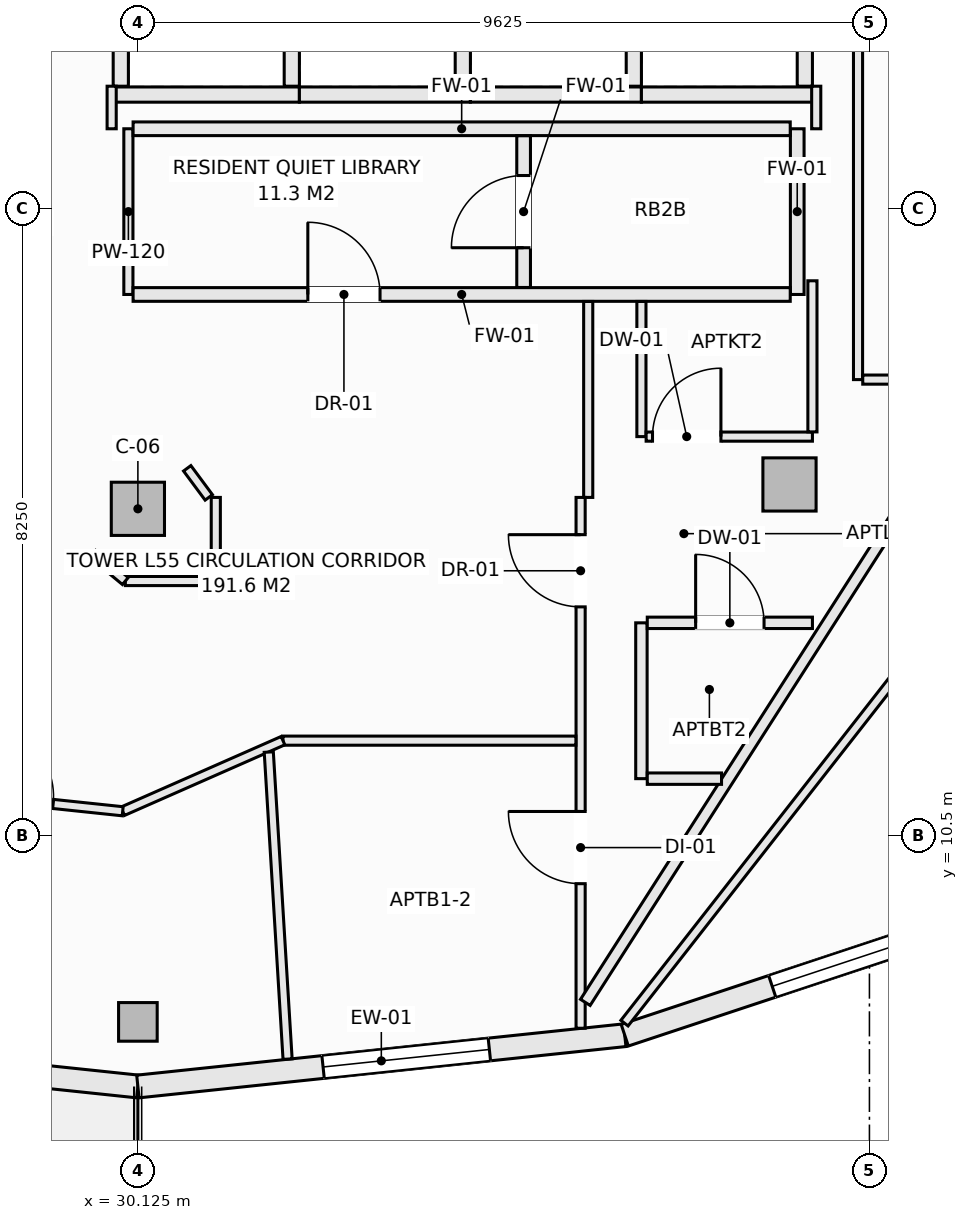
"""IFC4 building model, lengths in metres.
Left out: names, types, materials, properties, quantities, classifications, styles, units other than length and angle.
Written with IfcOpenShell. Run it as: python <this file> out.ifc"""

import sys

from ifc_helpers import new_model, si_unit, direction, frame, frame_2d, origin, origin_2d, place, context, subcontext, project, spatial, rectangle, hollow_rectangle, extrude, element, fill, save


model = new_model("IFC4")
c1 = context("Model", 3, precision=1e-05, world=origin(), true_north=direction((0.0, 1.0)))
c2 = subcontext(c1, "Body", "Model", "MODEL_VIEW")
j1 = project(units=[si_unit("LENGTHUNIT", "METRE"), si_unit("PLANEANGLEUNIT", "RADIAN")], contexts=[c1])
p1 = place(None, origin())
s1 = spatial("IfcSite", under=j1, at=p1, CompositionType="ELEMENT")
p2 = place(p1, origin())
s2 = spatial("IfcBuilding", under=s1, at=p2, CompositionType="ELEMENT")
p3 = place(p2, frame((0.0, 0.0, 209.6)))
s3 = spatial("IfcBuildingStorey", under=s2, at=p3, CompositionType="ELEMENT", Elevation=209.6)
p4 = place(p3, frame((30.125, 8.05, -0.27), z_axis=(0.0, 0.0, 1.0), x_axis=(1.0, 0.0, 0.0)))
e1 = element("IfcColumn", 1, at=p4, inside=s3, PredefinedType="COLUMN", context=c2, shape_type="SweptSolid", body=[
    extrude(hollow_rectangle(XDim=0.508, YDim=0.508, WallThickness=0.019, at=origin_2d()), origin(), (0.0, 0.0, 1.0), 3.3),
])
for number, where, z_axis, x_axis in (
    (2, (30.125, 14.8, -0.27), (0.0, 0.0, 1.0), (1.0, 0.0, 0.0)),
    (3, (38.698, 15.121, -0.27), (0.0, 0.0, 1.0), (1.0, 0.0, 0.0)),
):
    element("IfcColumn", number, at=place(p3, frame(where, z_axis=z_axis, x_axis=x_axis)), inside=s3, PredefinedType="COLUMN", context=c2, shape_type="SweptSolid", body=[
        extrude(rectangle(XDim=0.7, YDim=0.7, at=origin_2d()), origin(), (0.0, 0.0, 1.0), 3.3),
    ])
p5 = place(p3, frame((23.719, 7.875, 0.0), z_axis=(0.0, 0.0, 1.0), x_axis=(0.994497142298, -0.104763705363, 0.0)))
e4 = element("IfcWall", 4, at=p5, inside=s3, PredefinedType="SOLIDWALL", context=c2, shape_type="SweptSolid", body=[
    extrude(rectangle(XDim=6.441, YDim=0.3, at=frame_2d((3.221, 0.0))), origin(), (0.0, 0.0, 1.0), 2.605),
])
p6 = place(p5, frame((2.121, 0.0, 0.72)))
e5 = element("IfcOpeningElement", 5, at=p6, cuts=e4, PredefinedType="OPENING", context=c2, shape_type="SweptSolid", body=[
    extrude(rectangle(XDim=2.2, YDim=1.65, at=frame_2d((1.1, 0.825))), frame((0.0, 0.16, 0.0), z_axis=(0.0, -1.0, 0.0), x_axis=(1.0, 0.0, 0.0)), (0.0, 0.0, 1.0), 0.32),
])
p7 = place(p3, frame((30.125, 7.2, 0.0), z_axis=(0.0, 0.0, 1.0), x_axis=(0.994497142298, 0.104763705363, 0.0)))
e6 = element("IfcWall", 6, at=p7, inside=s3, PredefinedType="SOLIDWALL", context=c2, shape_type="SweptSolid", body=[
    extrude(rectangle(XDim=6.441, YDim=0.3, at=frame_2d((3.221, 0.0))), origin(), (0.0, 0.0, 1.0), 2.605),
])
p8 = place(p7, frame((2.45, 0.0, 0.72)))
e7 = element("IfcOpeningElement", 7, at=p8, cuts=e6, PredefinedType="OPENING", context=c2, shape_type="SweptSolid", body=[
    extrude(rectangle(XDim=2.2, YDim=1.65, at=frame_2d((1.1, 0.825))), frame((0.0, 0.16, 0.0), z_axis=(0.0, -1.0, 0.0), x_axis=(1.0, 0.0, 0.0)), (0.0, 0.0, 1.0), 0.32),
])
p9 = place(p3, frame((36.531, 7.875, 0.0), z_axis=(0.0, 0.0, 1.0), x_axis=(0.949240877604, 0.314550085495, 0.0)))
e8 = element("IfcWall", 8, at=p9, inside=s3, PredefinedType="SOLIDWALL", context=c2, shape_type="SweptSolid", body=[
    extrude(rectangle(XDim=6.288, YDim=0.3, at=frame_2d((3.144, 0.0))), origin(), (0.0, 0.0, 1.0), 2.605),
])
p10 = place(p9, frame((2.044, 0.0, 0.72)))
e9 = element("IfcOpeningElement", 9, at=p10, cuts=e8, PredefinedType="OPENING", context=c2, shape_type="SweptSolid", body=[
    extrude(rectangle(XDim=2.2, YDim=1.65, at=frame_2d((1.1, 0.825))), frame((0.0, 0.16, 0.0), z_axis=(0.0, -1.0, 0.0), x_axis=(1.0, 0.0, 0.0)), (0.0, 0.0, 1.0), 0.32),
])
p11 = place(p3, frame((29.8, 20.25, 0.0), z_axis=(0.0, 0.0, 1.0), x_axis=(1.0, 0.0, 0.0)))
e10 = element("IfcWall", 10, at=p11, inside=s3, PredefinedType="SOLIDWALL", context=c2, shape_type="SweptSolid", body=[
    extrude(rectangle(XDim=2.45, YDim=0.2, at=frame_2d((1.225, 0.0))), origin(), (0.0, 0.0, 1.0), 3.03),
])
for number, where, z_axis, x_axis in (
    (11, (29.9, 20.36, 0.0), (0.0, 0.0, 1.0), (0.0, 1.0, 0.0)),
    (12, (32.15, 20.36, 0.0), (0.0, 0.0, 1.0), (0.0, 1.0, 0.0)),
):
    element("IfcWall", number, at=place(p3, frame(where, z_axis=z_axis, x_axis=x_axis)), inside=s3, PredefinedType="SOLIDWALL", context=c2, shape_type="SweptSolid", body=[
        extrude(rectangle(XDim=2.43, YDim=0.2, at=frame_2d((1.215, 0.0))), origin(), (0.0, 0.0, 1.0), 3.03),
    ])
p12 = place(p3, frame((32.25, 20.25, 0.0), z_axis=(0.0, 0.0, 1.0), x_axis=(1.0, 0.0, 0.0)))
e13 = element("IfcWall", 13, at=p12, inside=s3, PredefinedType="SOLIDWALL", context=c2, shape_type="SweptSolid", body=[
    extrude(rectangle(XDim=2.25, YDim=0.2, at=frame_2d((1.125, 0.0))), origin(), (0.0, 0.0, 1.0), 3.03),
])
p13 = place(p3, frame((34.4, 20.36, 0.0), z_axis=(0.0, 0.0, 1.0), x_axis=(0.0, 1.0, 0.0)))
e14 = element("IfcWall", 14, at=p13, inside=s3, PredefinedType="SOLIDWALL", context=c2, shape_type="SweptSolid", body=[
    extrude(rectangle(XDim=2.43, YDim=0.2, at=frame_2d((1.215, 0.0))), origin(), (0.0, 0.0, 1.0), 3.03),
])
p14 = place(p3, frame((34.5, 20.25, 0.0), z_axis=(0.0, 0.0, 1.0), x_axis=(1.0, 0.0, 0.0)))
e15 = element("IfcWall", 15, at=p14, inside=s3, PredefinedType="SOLIDWALL", context=c2, shape_type="SweptSolid", body=[
    extrude(rectangle(XDim=2.25, YDim=0.2, at=frame_2d((1.125, 0.0))), origin(), (0.0, 0.0, 1.0), 3.03),
])
p15 = place(p3, frame((36.65, 20.36, 0.0), z_axis=(0.0, 0.0, 1.0), x_axis=(0.0, 1.0, 0.0)))
e16 = element("IfcWall", 16, at=p15, inside=s3, PredefinedType="SOLIDWALL", context=c2, shape_type="SweptSolid", body=[
    extrude(rectangle(XDim=2.43, YDim=0.2, at=frame_2d((1.215, 0.0))), origin(), (0.0, 0.0, 1.0), 3.03),
])
p16 = place(p3, frame((36.75, 20.25, 0.0), z_axis=(0.0, 0.0, 1.0), x_axis=(1.0, 0.0, 0.0)))
e17 = element("IfcWall", 17, at=p16, inside=s3, PredefinedType="SOLIDWALL", context=c2, shape_type="SweptSolid", body=[
    extrude(rectangle(XDim=2.25, YDim=0.2, at=frame_2d((1.125, 0.0))), origin(), (0.0, 0.0, 1.0), 3.03),
])
p17 = place(p3, frame((38.9, 20.36, 0.0), z_axis=(0.0, 0.0, 1.0), x_axis=(0.0, 1.0, 0.0)))
e18 = element("IfcWall", 18, at=p17, inside=s3, PredefinedType="SOLIDWALL", context=c2, shape_type="SweptSolid", body=[
    extrude(rectangle(XDim=2.43, YDim=0.2, at=frame_2d((1.215, 0.0))), origin(), (0.0, 0.0, 1.0), 3.03),
])
p18 = place(p3, frame((30.0, 17.62, 0.0), z_axis=(0.0, 0.0, 1.0), x_axis=(0.0, 1.0, 0.0)))
e19 = element("IfcWall", 19, at=p18, inside=s3, PredefinedType="PARTITIONING", context=c2, shape_type="SweptSolid", body=[
    extrude(rectangle(XDim=2.18, YDim=0.12, at=frame_2d((1.09, 0.0))), origin(), (0.0, 0.0, 1.0), 3.03),
])
p19 = place(p3, frame((38.8, 17.62, 0.0), z_axis=(0.0, 0.0, 1.0), x_axis=(0.0, 1.0, 0.0)))
e20 = element("IfcWall", 20, at=p19, inside=s3, PredefinedType="SOLIDWALL", context=c2, shape_type="SweptSolid", body=[
    extrude(rectangle(XDim=2.18, YDim=0.18, at=frame_2d((1.09, 0.0))), origin(), (0.0, 0.0, 1.0), 3.03),
])
p20 = place(p3, frame((30.062, 17.62, 0.0), z_axis=(0.0, 0.0, 1.0), x_axis=(1.0, 0.0, 0.0)))
e21 = element("IfcWall", 21, at=p20, inside=s3, PredefinedType="SOLIDWALL", context=c2, shape_type="SweptSolid", body=[
    extrude(rectangle(XDim=8.646, YDim=0.18, at=frame_2d((4.323, 0.0))), origin(), (0.0, 0.0, 1.0), 3.03),
])
p21 = place(p20, frame((2.299, 0.0, 0.0)))
e22 = element("IfcOpeningElement", 22, at=p21, cuts=e21, PredefinedType="OPENING", context=c2, shape_type="SweptSolid", body=[
    extrude(rectangle(XDim=0.95, YDim=2.1, at=frame_2d((0.475, 1.05))), frame((0.0, 0.1, 0.0), z_axis=(0.0, -1.0, 0.0), x_axis=(1.0, 0.0, 0.0)), (0.0, 0.0, 1.0), 0.2),
])
p22 = place(p3, frame((30.062, 19.8, 0.0), z_axis=(0.0, 0.0, 1.0), x_axis=(1.0, 0.0, 0.0)))
e23 = element("IfcWall", 23, at=p22, inside=s3, PredefinedType="SOLIDWALL", context=c2, shape_type="SweptSolid", body=[
    extrude(rectangle(XDim=8.646, YDim=0.18, at=frame_2d((4.323, 0.0))), origin(), (0.0, 0.0, 1.0), 3.03),
])
p23 = place(p3, frame((35.2, 17.712, 0.0), z_axis=(0.0, 0.0, 1.0), x_axis=(0.0, 1.0, 0.0)))
e24 = element("IfcWall", 24, at=p23, inside=s3, PredefinedType="SOLIDWALL", context=c2, shape_type="SweptSolid", body=[
    extrude(rectangle(XDim=1.996, YDim=0.18, at=frame_2d((0.998, 0.0))), origin(), (0.0, 0.0, 1.0), 3.03),
])
p24 = place(p23, frame((0.523, 0.0, 0.0)))
e25 = element("IfcOpeningElement", 25, at=p24, cuts=e24, PredefinedType="OPENING", context=c2, shape_type="SweptSolid", body=[
    extrude(rectangle(XDim=0.95, YDim=2.1, at=frame_2d((0.475, 1.05))), frame((0.0, 0.1, 0.0), z_axis=(0.0, -1.0, 0.0), x_axis=(1.0, 0.0, 0.0)), (0.0, 0.0, 1.0), 0.2),
])
p25 = place(p3, frame((39.05, 19.8, 0.0), z_axis=(0.0, 0.0, 1.0), x_axis=(0.0, 1.0, 0.0)))
e26 = element("IfcWall", 26, at=p25, inside=s3, PredefinedType="PARTITIONING", context=c2, shape_type="SweptSolid", body=[
    extrude(rectangle(XDim=0.56, YDim=0.12, at=frame_2d((0.28, 0.0))), origin(), (0.0, 0.0, 1.0), 3.03),
])
p26 = place(p3, frame((39.6, 16.5, 0.0), z_axis=(0.0, 0.0, 1.0), x_axis=(0.0, 1.0, 0.0)))
e27 = element("IfcWall", 27, at=p26, inside=s3, PredefinedType="PARTITIONING", context=c2, shape_type="SweptSolid", body=[
    extrude(rectangle(XDim=6.52, YDim=0.12, at=frame_2d((3.26, 0.0))), origin(), (0.0, 0.0, 1.0), 2.478),
])
p27 = place(p3, frame((36.527, 8.034, 0.0), z_axis=(0.0, 0.0, 1.0), x_axis=(0.616547497682, 0.787317714206, 0.0)))
e28 = element("IfcWall", 28, at=p27, inside=s3, PredefinedType="PARTITIONING", context=c2, shape_type="SweptSolid", body=[
    extrude(rectangle(XDim=13.151, YDim=0.12, at=frame_2d((6.576, 0.0))), origin(), (0.0, 0.0, 1.0), 3.03),
])
p28 = place(p27, frame((11.24, 0.0, 0.0)))
e29 = element("IfcOpeningElement", 29, at=p28, cuts=e28, PredefinedType="OPENING", context=c2, shape_type="SweptSolid", body=[
    extrude(rectangle(XDim=0.95, YDim=2.1, at=frame_2d((0.475, 1.05))), frame((0.0, 0.07, 0.0), z_axis=(0.0, -1.0, 0.0), x_axis=(1.0, 0.0, 0.0)), (0.0, 0.0, 1.0), 0.14),
])
p29 = place(p3, frame((39.662, 16.5, 0.0), z_axis=(0.0, 0.0, 1.0), x_axis=(1.0, 0.0, 0.0)))
e30 = element("IfcWall", 30, at=p29, inside=s3, PredefinedType="PARTITIONING", context=c2, shape_type="SweptSolid", body=[
    extrude(rectangle(XDim=3.416, YDim=0.12, at=frame_2d((1.708, 0.0))), origin(), (0.0, 0.0, 1.0), 2.712),
])
p30 = place(p3, frame((29.78, 19.8, 0.0), z_axis=(0.0, 0.0, 1.0), x_axis=(0.0, 1.0, 0.0)))
e31 = element("IfcWall", 31, at=p30, inside=s3, PredefinedType="PARTITIONING", context=c2, shape_type="SweptSolid", body=[
    extrude(rectangle(XDim=0.56, YDim=0.12, at=frame_2d((0.28, 0.0))), origin(), (0.0, 0.0, 1.0), 3.03),
])
p31 = place(p3, frame((36.05, 14.95, 0.0), z_axis=(0.0, 0.0, 1.0), x_axis=(0.0, 1.0, 0.0)))
e32 = element("IfcWall", 32, at=p31, inside=s3, PredefinedType="PARTITIONING", context=c2, shape_type="SweptSolid", body=[
    extrude(rectangle(XDim=2.578, YDim=0.12, at=frame_2d((1.289, 0.0))), origin(), (0.0, 0.0, 1.0), 3.03),
])
p32 = place(p3, frame((35.95, 7.966, 0.0), z_axis=(0.0, 0.0, 1.0), x_axis=(0.0, 1.0, 0.0)))
e33 = element("IfcWall", 33, at=p32, inside=s3, PredefinedType="PARTITIONING", context=c2, shape_type="SweptSolid", body=[
    extrude(rectangle(XDim=6.984, YDim=0.12, at=frame_2d((3.492, 0.0))), origin(), (0.0, 0.0, 1.0), 2.712),
])
p33 = place(p32, frame((5.544, 0.0, 0.0)))
e34 = element("IfcOpeningElement", 34, at=p33, cuts=e33, PredefinedType="OPENING", context=c2, shape_type="SweptSolid", body=[
    extrude(rectangle(XDim=0.95, YDim=2.1, at=frame_2d((0.475, 1.05))), frame((0.0, 0.07, 0.0), z_axis=(0.0, -1.0, 0.0), x_axis=(1.0, 0.0, 0.0)), (0.0, 0.0, 1.0), 0.14),
])
p34 = place(p32, frame((1.902, 0.0, 0.0)))
e35 = element("IfcOpeningElement", 35, at=p34, cuts=e33, PredefinedType="OPENING", context=c2, shape_type="SweptSolid", body=[
    extrude(rectangle(XDim=0.95, YDim=2.1, at=frame_2d((0.475, 1.05))), frame((0.0, 0.07, 0.0), z_axis=(0.0, -1.0, 0.0), x_axis=(1.0, 0.0, 0.0)), (0.0, 0.0, 1.0), 0.14),
])
p35 = place(p3, frame((32.034, 11.75, 0.0), z_axis=(0.0, 0.0, 1.0), x_axis=(1.0, 0.0, 0.0)))
e36 = element("IfcWall", 36, at=p35, inside=s3, PredefinedType="PARTITIONING", context=c2, shape_type="SweptSolid", body=[
    extrude(rectangle(XDim=3.854, YDim=0.12, at=frame_2d((1.927, 0.0))), origin(), (0.0, 0.0, 1.0), 3.03),
])
p36 = place(p3, frame((29.925, 10.821, 0.0), z_axis=(0.0, 0.0, 1.0), x_axis=(0.915147800009, 0.403118474072, 0.0)))
e37 = element("IfcWall", 37, at=p36, inside=s3, PredefinedType="PARTITIONING", context=c2, shape_type="SweptSolid", body=[
    extrude(rectangle(XDim=2.304, YDim=0.12, at=frame_2d((1.152, 0.0))), origin(), (0.0, 0.0, 1.0), 3.03),
])
p37 = place(p3, frame((27.15, 11.113, 0.0), z_axis=(0.0, 0.0, 1.0), x_axis=(0.994510245906, -0.104639241146, 0.0)))
e38 = element("IfcWall", 38, at=p37, inside=s3, PredefinedType="PARTITIONING", context=c2, shape_type="SweptSolid", body=[
    extrude(rectangle(XDim=2.791, YDim=0.12, at=frame_2d((1.395, 0.0))), origin(), (0.0, 0.0, 1.0), 3.03),
])
p38 = place(p37, frame((0.92, 0.0, 0.0)))
e39 = element("IfcOpeningElement", 39, at=p38, cuts=e38, PredefinedType="OPENING", context=c2, shape_type="SweptSolid", body=[
    extrude(rectangle(XDim=0.95, YDim=2.1, at=frame_2d((0.475, 1.05))), frame((0.0, 0.07, 0.0), z_axis=(0.0, -1.0, 0.0), x_axis=(1.0, 0.0, 0.0)), (0.0, 0.0, 1.0), 0.14),
])
p39 = place(p3, frame((29.96, 13.85, 0.0), z_axis=(0.0, 0.0, 1.0), x_axis=(1.0, 0.0, 0.0)))
e40 = element("IfcWall", 40, at=p39, inside=s3, PredefinedType="PARTITIONING", context=c2, shape_type="SweptSolid", body=[
    extrude(rectangle(XDim=1.19, YDim=0.12, at=frame_2d((0.595, 0.0))), origin(), (0.0, 0.0, 1.0), 3.03),
])
p40 = place(p3, frame((31.15, 13.912, 0.0), z_axis=(0.0, 0.0, 1.0), x_axis=(0.0, 1.0, 0.0)))
e41 = element("IfcWall", 41, at=p40, inside=s3, PredefinedType="PARTITIONING", context=c2, shape_type="SweptSolid", body=[
    extrude(rectangle(XDim=1.038, YDim=0.12, at=frame_2d((0.519, 0.0))), origin(), (0.0, 0.0, 1.0), 3.03),
])
p41 = place(p3, frame((30.774, 15.333, 0.0), z_axis=(0.0, 0.0, 1.0), x_axis=(0.595814974861, -0.803121731577, 0.0)))
e42 = element("IfcWall", 42, at=p41, inside=s3, PredefinedType="PARTITIONING", context=c2, shape_type="SweptSolid", body=[
    extrude(rectangle(XDim=0.477, YDim=0.12, at=frame_2d((0.239, 0.0))), origin(), (0.0, 0.0, 1.0), 3.03),
])
p42 = place(p3, frame((29.531, 14.206, 0.0), z_axis=(0.0, 0.0, 1.0), x_axis=(0.7695479554, -0.638589026166, 0.0)))
e43 = element("IfcWall", 43, at=p42, inside=s3, PredefinedType="PARTITIONING", context=c2, shape_type="SweptSolid", body=[
    extrude(rectangle(XDim=0.557, YDim=0.12, at=frame_2d((0.279, 0.0))), origin(), (0.0, 0.0, 1.0), 3.03),
])
p43 = place(p3, frame((31.847, 11.6, 0.0), z_axis=(0.0, 0.0, 1.0), x_axis=(0.061108836762, -0.998131108657, 0.0)))
e44 = element("IfcWall", 44, at=p43, inside=s3, PredefinedType="PARTITIONING", context=c2, shape_type="SweptSolid", body=[
    extrude(rectangle(XDim=4.047, YDim=0.12, at=frame_2d((2.023, 0.0))), origin(), (0.0, 0.0, 1.0), 3.03),
])
p44 = place(p3, frame((36.75, 11.25, 0.0), z_axis=(0.0, 0.0, 1.0), x_axis=(0.0, 1.0, 0.0)))
e45 = element("IfcWall", 45, at=p44, inside=s3, PredefinedType="PARTITIONING", context=c2, shape_type="SweptSolid", body=[
    extrude(rectangle(XDim=2.05, YDim=0.15, at=frame_2d((1.025, 0.0))), origin(), (0.0, 0.0, 1.0), 3.03),
])
p45 = place(p3, frame((36.75, 15.75, 0.0), z_axis=(0.0, 0.0, 1.0), x_axis=(0.0, 1.0, 0.0)))
e46 = element("IfcWall", 46, at=p45, inside=s3, PredefinedType="PARTITIONING", context=c2, shape_type="SweptSolid", body=[
    extrude(rectangle(XDim=1.778, YDim=0.12, at=frame_2d((0.889, 0.0))), origin(), (0.0, 0.0, 1.0), 3.03),
])
p46 = place(p3, frame((36.812, 15.75, 0.0), z_axis=(0.0, 0.0, 1.0), x_axis=(1.0, 0.0, 0.0)))
e47 = element("IfcWall", 47, at=p46, inside=s3, PredefinedType="PARTITIONING", context=c2, shape_type="SweptSolid", body=[
    extrude(rectangle(XDim=2.188, YDim=0.12, at=frame_2d((1.094, 0.0))), origin(), (0.0, 0.0, 1.0), 3.03),
])
p47 = place(p46, frame((0.084, 0.0, 0.0)))
e48 = element("IfcOpeningElement", 48, at=p47, cuts=e47, PredefinedType="OPENING", context=c2, shape_type="SweptSolid", body=[
    extrude(rectangle(XDim=0.9, YDim=2.1, at=frame_2d((0.45, 1.05))), frame((0.0, 0.07, 0.0), z_axis=(0.0, -1.0, 0.0), x_axis=(1.0, 0.0, 0.0)), (0.0, 0.0, 1.0), 0.14),
])
p48 = place(p3, frame((39.0, 15.812, 0.0), z_axis=(0.0, 0.0, 1.0), x_axis=(0.0, 1.0, 0.0)))
e49 = element("IfcWall", 49, at=p48, inside=s3, PredefinedType="PARTITIONING", context=c2, shape_type="SweptSolid", body=[
    extrude(rectangle(XDim=1.988, YDim=0.12, at=frame_2d((0.994, 0.0))), origin(), (0.0, 0.0, 1.0), 2.478),
])
p49 = place(p3, frame((36.012, 8.307, 0.0), z_axis=(0.0, 0.0, 1.0), x_axis=(0.539002742545, 0.842304008971, 0.0)))
e50 = element("IfcWall", 50, at=p49, inside=s3, PredefinedType="PARTITIONING", context=c2, shape_type="SweptSolid", body=[
    extrude(rectangle(XDim=9.654, YDim=0.15, at=frame_2d((4.827, 0.0))), origin(), (0.0, 0.0, 1.0), 3.03),
])
p50 = place(p3, frame((36.827, 13.3, 0.0), z_axis=(0.0, 0.0, 1.0), x_axis=(1.0, 0.0, 0.0)))
e51 = element("IfcWall", 51, at=p50, inside=s3, PredefinedType="PARTITIONING", context=c2, shape_type="SweptSolid", body=[
    extrude(rectangle(XDim=2.173, YDim=0.15, at=frame_2d((1.086, 0.0))), origin(), (0.0, 0.0, 1.0), 3.03),
])
p51 = place(p50, frame((0.636, 0.0, 0.0)))
e52 = element("IfcOpeningElement", 52, at=p51, cuts=e51, PredefinedType="OPENING", context=c2, shape_type="SweptSolid", body=[
    extrude(rectangle(XDim=0.9, YDim=2.1, at=frame_2d((0.45, 1.05))), frame((0.0, 0.085, 0.0), z_axis=(0.0, -1.0, 0.0), x_axis=(1.0, 0.0, 0.0)), (0.0, 0.0, 1.0), 0.17),
])
p52 = place(p3, frame((36.827, 11.25, 0.0), z_axis=(0.0, 0.0, 1.0), x_axis=(1.0, 0.0, 0.0)))
e53 = element("IfcWall", 53, at=p52, inside=s3, PredefinedType="PARTITIONING", context=c2, shape_type="SweptSolid", body=[
    extrude(rectangle(XDim=0.977, YDim=0.15, at=frame_2d((0.489, 0.0))), origin(), (0.0, 0.0, 1.0), 3.03),
])
p53 = place(p8, origin())
e54 = element("IfcWindow", 54, at=p53, inside=s3, PartitioningType="SINGLE_PANEL", PredefinedType="WINDOW", context=c2, shape_type="SweptSolid", body=[
    extrude(rectangle(XDim=2.2, YDim=1.65, at=frame_2d((1.1, 0.825))), frame((0.0, 0.03, 0.0), z_axis=(0.0, -1.0, 0.0), x_axis=(1.0, 0.0, 0.0)), (0.0, 0.0, 1.0), 0.06),
])
fill(e7, e54)
p54 = place(p10, origin())
e55 = element("IfcWindow", 55, at=p54, inside=s3, PartitioningType="SINGLE_PANEL", PredefinedType="WINDOW", context=c2, shape_type="SweptSolid", body=[
    extrude(rectangle(XDim=2.2, YDim=1.65, at=frame_2d((1.1, 0.825))), frame((0.0, 0.03, 0.0), z_axis=(0.0, -1.0, 0.0), x_axis=(1.0, 0.0, 0.0)), (0.0, 0.0, 1.0), 0.06),
])
fill(e9, e55)
p55 = place(p21, origin())
e56 = element("IfcDoor", 56, at=p55, inside=s3, OperationType="SINGLE_SWING_LEFT", PredefinedType="DOOR", context=c2, shape_type="SweptSolid", body=[
    extrude(rectangle(XDim=0.95, YDim=2.1, at=frame_2d((0.475, 1.05))), frame((0.0, 0.025, 0.0), z_axis=(0.0, -1.0, 0.0), x_axis=(1.0, 0.0, 0.0)), (0.0, 0.0, 1.0), 0.05),
])
fill(e22, e56)
p56 = place(p38, origin())
e57 = element("IfcDoor", 57, at=p56, inside=s3, OperationType="SINGLE_SWING_LEFT", PredefinedType="DOOR", context=c2, shape_type="SweptSolid", body=[
    extrude(rectangle(XDim=0.95, YDim=2.1, at=frame_2d((0.475, 1.05))), frame((0.0, 0.025, 0.0), z_axis=(0.0, -1.0, 0.0), x_axis=(1.0, 0.0, 0.0)), (0.0, 0.0, 1.0), 0.05),
])
fill(e39, e57)
p57 = place(p33, origin())
e58 = element("IfcDoor", 58, at=p57, inside=s3, OperationType="SINGLE_SWING_RIGHT", PredefinedType="DOOR", context=c2, shape_type="SweptSolid", body=[
    extrude(rectangle(XDim=0.95, YDim=2.1, at=frame_2d((0.475, 1.05))), frame((0.0, 0.025, 0.0), z_axis=(0.0, -1.0, 0.0), x_axis=(1.0, 0.0, 0.0)), (0.0, 0.0, 1.0), 0.05),
])
fill(e34, e58)
p58 = place(p47, origin())
e59 = element("IfcDoor", 59, at=p58, inside=s3, OperationType="SINGLE_SWING_RIGHT", PredefinedType="DOOR", context=c2, shape_type="SweptSolid", body=[
    extrude(rectangle(XDim=0.9, YDim=2.1, at=frame_2d((0.45, 1.05))), frame((0.0, 0.025, 0.0), z_axis=(0.0, -1.0, 0.0), x_axis=(1.0, 0.0, 0.0)), (0.0, 0.0, 1.0), 0.05),
])
fill(e48, e59)
p59 = place(p51, origin())
e60 = element("IfcDoor", 60, at=p59, inside=s3, OperationType="SINGLE_SWING_LEFT", PredefinedType="DOOR", context=c2, shape_type="SweptSolid", body=[
    extrude(rectangle(XDim=0.9, YDim=2.1, at=frame_2d((0.45, 1.05))), frame((0.0, 0.025, 0.0), z_axis=(0.0, -1.0, 0.0), x_axis=(1.0, 0.0, 0.0)), (0.0, 0.0, 1.0), 0.05),
])
fill(e52, e60)
p60 = place(p34, origin())
e61 = element("IfcDoor", 61, at=p60, inside=s3, OperationType="SINGLE_SWING_RIGHT", PredefinedType="DOOR", context=c2, shape_type="SweptSolid", body=[
    extrude(rectangle(XDim=0.95, YDim=2.1, at=frame_2d((0.475, 1.05))), frame((0.0, 0.025, 0.0), z_axis=(0.0, -1.0, 0.0), x_axis=(1.0, 0.0, 0.0)), (0.0, 0.0, 1.0), 0.05),
])
fill(e35, e61)
p61 = place(p24, origin())
e62 = element("IfcDoor", 62, at=p61, inside=s3, OperationType="SINGLE_SWING_LEFT", PredefinedType="DOOR", context=c2, shape_type="SweptSolid", body=[
    extrude(rectangle(XDim=0.95, YDim=2.1, at=frame_2d((0.475, 1.05))), frame((0.0, 0.025, 0.0), z_axis=(0.0, -1.0, 0.0), x_axis=(1.0, 0.0, 0.0)), (0.0, 0.0, 1.0), 0.05),
])
fill(e25, e62)
save(model, sys.argv[1])
